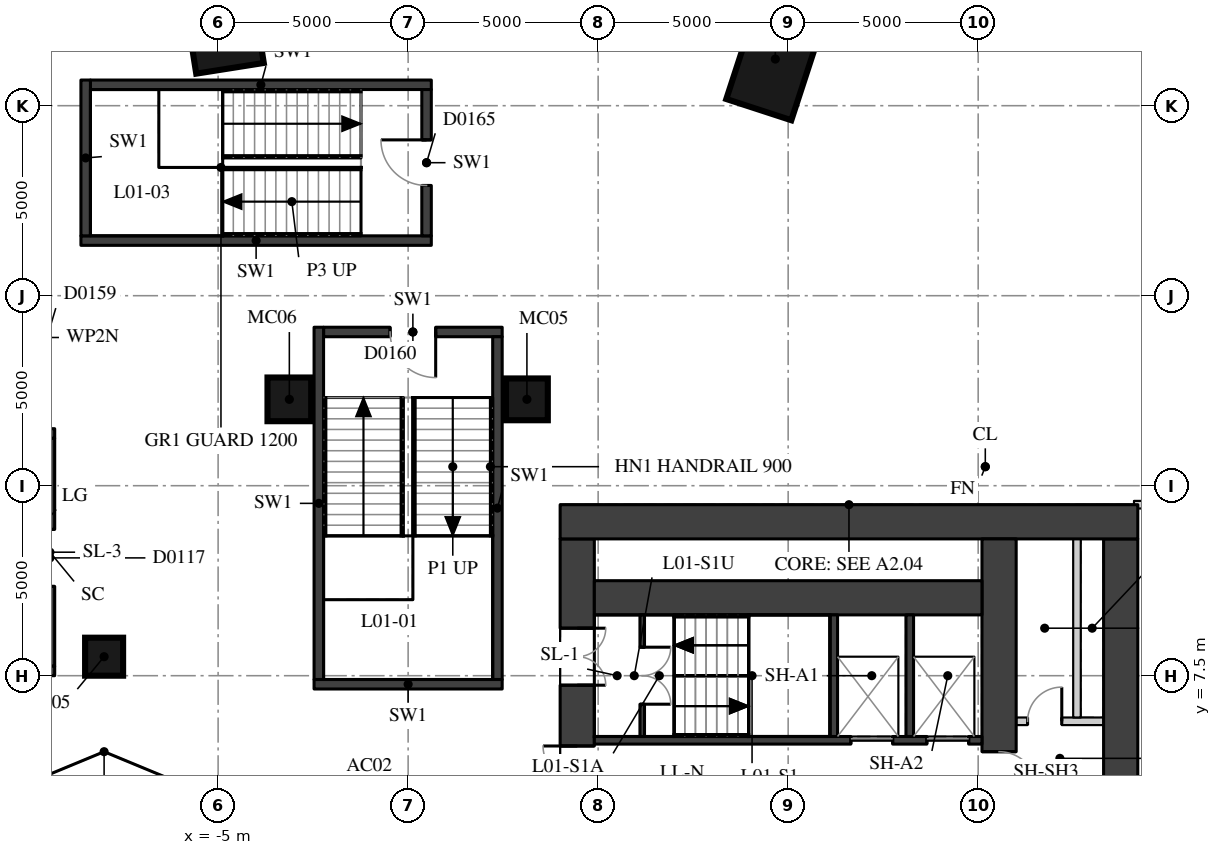
"""IFC4 building model, lengths in metres.
Left out: names, types, materials, properties, quantities, classifications, styles, units other than length and angle.
Written with IfcOpenShell. Run it as: python <this file> out.ifc"""

import sys

from ifc_helpers import new_model, si_unit, direction, frame, frame_2d, origin, origin_2d, place, context, subcontext, project, spatial, rectangle, extrude, element, fill, save


model = new_model("IFC4")
c1 = context("Model", 3, precision=1e-05, world=origin(), true_north=direction((0.0, 1.0)))
c2 = subcontext(c1, "Body", "Model", "MODEL_VIEW")
j1 = project(units=[si_unit("LENGTHUNIT", "METRE"), si_unit("PLANEANGLEUNIT", "RADIAN")], contexts=[c1])
p1 = place(None, origin())
s1 = spatial("IfcSite", under=j1, at=p1, CompositionType="ELEMENT")
p2 = place(p1, origin())
s2 = spatial("IfcBuilding", under=s1, at=p2, CompositionType="ELEMENT")
p3 = place(p2, frame((0.0, 0.0, 7.5)))
s3 = spatial("IfcBuildingStorey", under=s2, at=p3, CompositionType="ELEMENT", Elevation=7.5)
for number, where, z_axis, x_axis in (
    (1, (9.662, 23.727, 0.0), (0.0, 0.0, 1.0), (0.31, 0.951, 0.0)),
    (2, (-4.906, 24.866, 0.0), (0.0, 0.0, 1.0), (-0.156, 0.988, 0.0)),
):
    element("IfcColumn", number, at=place(p3, frame(where, z_axis=z_axis, x_axis=x_axis)), inside=s3, PredefinedType="COLUMN", context=c2, shape_type="SweptSolid", body=[
        extrude(rectangle(XDim=2.8, YDim=1.8, at=origin_2d()), origin(), (0.0, 0.0, 1.0), 5.0),
    ])
p4 = place(p3, frame((-8.0, 8.0, 0.0), z_axis=(0.0, 0.0, 1.0), x_axis=(1.0, 0.0, 0.0)))
e3 = element("IfcColumn", 3, at=p4, inside=s3, PredefinedType="COLUMN", context=c2, shape_type="SweptSolid", body=[
    extrude(rectangle(XDim=1.0, YDim=1.0, at=origin_2d()), origin(), (0.0, 0.0, 1.0), 5.0),
])
p5 = place(p3, frame((3.126, 14.772, 0.0), z_axis=(0.0, 0.0, 1.0), x_axis=(1.0, 0.0, 0.0)))
e4 = element("IfcColumn", 4, at=p5, inside=s3, PredefinedType="COLUMN", context=c2, shape_type="SweptSolid", body=[
    extrude(rectangle(XDim=1.1, YDim=1.1, at=origin_2d()), origin(), (0.0, 0.0, 1.0), 5.0),
])
p6 = place(p3, frame((-3.126, 14.772, 0.0), z_axis=(0.0, 0.0, 1.0), x_axis=(1.0, 0.0, 0.0)))
e5 = element("IfcColumn", 5, at=p6, inside=s3, PredefinedType="COLUMN", context=c2, shape_type="SweptSolid", body=[
    extrude(rectangle(XDim=1.15, YDim=1.15, at=origin_2d()), origin(), (0.0, 0.0, 1.0), 5.0),
])
p7 = place(p3, frame((4.45, -11.1, 0.0), z_axis=(0.0, 0.0, 1.0), x_axis=(0.0, 1.0, 0.0)))
e6 = element("IfcWall", 6, at=p7, inside=s3, PredefinedType="SHEAR", context=c2, shape_type="SweptSolid", body=[
    extrude(rectangle(XDim=22.2, YDim=0.9, at=frame_2d((11.1, 0.0))), origin(), (0.0, 0.0, 1.0), 4.59),
])
p8 = place(p7, frame((2.35, 0.0, 0.0)))
e7 = element("IfcOpeningElement", 7, at=p8, cuts=e6, PredefinedType="OPENING", context=c2, shape_type="SweptSolid", body=[
    extrude(rectangle(XDim=1.5, YDim=2.1, at=frame_2d((0.75, 1.05))), frame((0.0, 0.46, 0.0), z_axis=(0.0, -1.0, 0.0), x_axis=(1.0, 0.0, 0.0)), (0.0, 0.0, 1.0), 0.92),
])
p9 = place(p7, frame((5.45, 0.0, 0.0)))
e8 = element("IfcOpeningElement", 8, at=p9, cuts=e6, PredefinedType="OPENING", context=c2, shape_type="SweptSolid", body=[
    extrude(rectangle(XDim=1.8, YDim=2.1, at=frame_2d((0.9, 1.05))), frame((0.0, 0.46, 0.0), z_axis=(0.0, -1.0, 0.0), x_axis=(1.0, 0.0, 0.0)), (0.0, 0.0, 1.0), 0.92),
])
p10 = place(p7, frame((7.95, 0.0, 0.0)))
e9 = element("IfcOpeningElement", 9, at=p10, cuts=e6, PredefinedType="OPENING", context=c2, shape_type="SweptSolid", body=[
    extrude(rectangle(XDim=1.1, YDim=2.1, at=frame_2d((0.55, 1.05))), frame((0.0, 0.46, 0.0), z_axis=(0.0, -1.0, 0.0), x_axis=(1.0, 0.0, 0.0)), (0.0, 0.0, 1.0), 0.92),
])
p11 = place(p7, frame((10.6, 0.0, 0.0)))
e10 = element("IfcOpeningElement", 10, at=p11, cuts=e6, PredefinedType="OPENING", context=c2, shape_type="SweptSolid", body=[
    extrude(rectangle(XDim=1.0, YDim=2.1, at=frame_2d((0.5, 1.05))), frame((0.0, 0.46, 0.0), z_axis=(0.0, -1.0, 0.0), x_axis=(1.0, 0.0, 0.0)), (0.0, 0.0, 1.0), 0.92),
])
p12 = place(p7, frame((13.15, 0.0, 0.0)))
e11 = element("IfcOpeningElement", 11, at=p12, cuts=e6, PredefinedType="OPENING", context=c2, shape_type="SweptSolid", body=[
    extrude(rectangle(XDim=1.1, YDim=2.1, at=frame_2d((0.55, 1.05))), frame((0.0, 0.46, 0.0), z_axis=(0.0, -1.0, 0.0), x_axis=(1.0, 0.0, 0.0)), (0.0, 0.0, 1.0), 0.92),
])
p13 = place(p7, frame((14.95, 0.0, 0.0)))
e12 = element("IfcOpeningElement", 12, at=p13, cuts=e6, PredefinedType="OPENING", context=c2, shape_type="SweptSolid", body=[
    extrude(rectangle(XDim=1.8, YDim=2.1, at=frame_2d((0.9, 1.05))), frame((0.0, 0.46, 0.0), z_axis=(0.0, -1.0, 0.0), x_axis=(1.0, 0.0, 0.0)), (0.0, 0.0, 1.0), 0.92),
])
p14 = place(p7, frame((18.35, 0.0, 0.0)))
e13 = element("IfcOpeningElement", 13, at=p14, cuts=e6, PredefinedType="OPENING", context=c2, shape_type="SweptSolid", body=[
    extrude(rectangle(XDim=1.5, YDim=2.1, at=frame_2d((0.75, 1.05))), frame((0.0, 0.46, 0.0), z_axis=(0.0, -1.0, 0.0), x_axis=(1.0, 0.0, 0.0)), (0.0, 0.0, 1.0), 0.92),
])
p15 = place(p3, frame((18.75, -11.1, 0.0), z_axis=(0.0, 0.0, 1.0), x_axis=(0.0, 1.0, 0.0)))
e14 = element("IfcWall", 14, at=p15, inside=s3, PredefinedType="SHEAR", context=c2, shape_type="SweptSolid", body=[
    extrude(rectangle(XDim=22.2, YDim=0.9, at=frame_2d((11.1, 0.0))), origin(), (0.0, 0.0, 1.0), 4.59),
])
p16 = place(p3, frame((4.0, 11.55, 0.0), z_axis=(0.0, 0.0, 1.0), x_axis=(1.0, 0.0, 0.0)))
e15 = element("IfcWall", 15, at=p16, inside=s3, PredefinedType="SHEAR", context=c2, shape_type="SweptSolid", body=[
    extrude(rectangle(XDim=15.2, YDim=0.9, at=frame_2d((7.6, 0.0))), origin(), (0.0, 0.0, 1.0), 4.59),
])
p17 = place(p3, frame((15.55, -11.1, 0.0), z_axis=(0.0, 0.0, 1.0), x_axis=(0.0, 1.0, 0.0)))
e16 = element("IfcWall", 16, at=p17, inside=s3, PredefinedType="SHEAR", context=c2, shape_type="SweptSolid", body=[
    extrude(rectangle(XDim=22.2, YDim=0.9, at=frame_2d((11.1, 0.0))), origin(), (0.0, 0.0, 1.0), 4.59),
])
p18 = place(p17, frame((15.6, 0.0, 0.0)))
e17 = element("IfcOpeningElement", 17, at=p18, cuts=e16, PredefinedType="OPENING", context=c2, shape_type="SweptSolid", body=[
    extrude(rectangle(XDim=1.0, YDim=2.1, at=frame_2d((0.5, 1.05))), frame((0.0, 0.46, 0.0), z_axis=(0.0, -1.0, 0.0), x_axis=(1.0, 0.0, 0.0)), (0.0, 0.0, 1.0), 0.92),
])
p19 = place(p17, frame((5.6, 0.0, 0.0)))
e18 = element("IfcOpeningElement", 18, at=p19, cuts=e16, PredefinedType="OPENING", context=c2, shape_type="SweptSolid", body=[
    extrude(rectangle(XDim=1.0, YDim=2.1, at=frame_2d((0.5, 1.05))), frame((0.0, 0.46, 0.0), z_axis=(0.0, -1.0, 0.0), x_axis=(1.0, 0.0, 0.0)), (0.0, 0.0, 1.0), 0.92),
])
p20 = place(p3, frame((4.9, 9.55, 0.0), z_axis=(0.0, 0.0, 1.0), x_axis=(1.0, 0.0, 0.0)))
e19 = element("IfcWall", 19, at=p20, inside=s3, PredefinedType="SHEAR", context=c2, shape_type="SweptSolid", body=[
    extrude(rectangle(XDim=10.2, YDim=0.9, at=frame_2d((5.1, 0.0))), origin(), (0.0, 0.0, 1.0), 4.59),
])
p21 = place(p3, frame((4.9, 5.8, 0.0), z_axis=(0.0, 0.0, 1.0), x_axis=(1.0, 0.0, 0.0)))
e20 = element("IfcWall", 20, at=p21, inside=s3, PredefinedType="SHEAR", context=c2, shape_type="SweptSolid", body=[
    extrude(rectangle(XDim=10.2, YDim=0.2, at=frame_2d((5.1, 0.0))), origin(), (0.0, 0.0, 1.0), 4.59),
])
p22 = place(p21, frame((6.75, 0.0, 0.0)))
e21 = element("IfcOpeningElement", 21, at=p22, cuts=e20, PredefinedType="OPENING", context=c2, shape_type="SweptSolid", body=[
    extrude(rectangle(XDim=1.1, YDim=2.1, at=frame_2d((0.55, 1.05))), frame((0.0, 0.11, 0.0), z_axis=(0.0, -1.0, 0.0), x_axis=(1.0, 0.0, 0.0)), (0.0, 0.0, 1.0), 0.22),
])
p23 = place(p21, frame((8.75, 0.0, 0.0)))
e22 = element("IfcOpeningElement", 22, at=p23, cuts=e20, PredefinedType="OPENING", context=c2, shape_type="SweptSolid", body=[
    extrude(rectangle(XDim=1.1, YDim=2.1, at=frame_2d((0.55, 1.05))), frame((0.0, 0.11, 0.0), z_axis=(0.0, -1.0, 0.0), x_axis=(1.0, 0.0, 0.0)), (0.0, 0.0, 1.0), 0.22),
])
for number, where, z_axis, x_axis in (
    (23, (11.2, 5.9, 0.0), (0.0, 0.0, 1.0), (0.0, 1.0, 0.0)),
    (24, (13.2, 5.9, 0.0), (0.0, 0.0, 1.0), (0.0, 1.0, 0.0)),
):
    element("IfcWall", number, at=place(p3, frame(where, z_axis=z_axis, x_axis=x_axis)), inside=s3, PredefinedType="SHEAR", context=c2, shape_type="SweptSolid", body=[
        extrude(rectangle(XDim=3.2, YDim=0.2, at=frame_2d((1.6, 0.0))), origin(), (0.0, 0.0, 1.0), 4.59),
    ])
p24 = place(p3, frame((6.16, 5.9, 0.0), z_axis=(0.0, 0.0, 1.0), x_axis=(0.0, 1.0, 0.0)))
e25 = element("IfcWall", 25, at=p24, inside=s3, PredefinedType="SHEAR", context=c2, shape_type="SweptSolid", body=[
    extrude(rectangle(XDim=3.2, YDim=0.12, at=frame_2d((1.6, 0.0))), origin(), (0.0, 0.0, 1.0), 2.29),
])
p25 = place(p24, frame((0.85, 0.0, 0.0)))
e26 = element("IfcOpeningElement", 26, at=p25, cuts=e25, PredefinedType="OPENING", context=c2, shape_type="SweptSolid", body=[
    extrude(rectangle(XDim=1.5, YDim=2.1, at=frame_2d((0.75, 1.05))), frame((0.0, 0.07, 0.0), z_axis=(0.0, -1.0, 0.0), x_axis=(1.0, 0.0, 0.0)), (0.0, 0.0, 1.0), 0.14),
])
p26 = place(p3, frame((16.0, 6.3, 0.0), z_axis=(0.0, 0.0, 1.0), x_axis=(1.0, 0.0, 0.0)))
e27 = element("IfcWall", 27, at=p26, inside=s3, PredefinedType="PARTITIONING", context=c2, shape_type="SweptSolid", body=[
    extrude(rectangle(XDim=2.3, YDim=0.2, at=frame_2d((1.15, 0.0))), origin(), (0.0, 0.0, 1.0), 4.59),
])
p27 = place(p26, frame((0.3, 0.0, 0.0)))
e28 = element("IfcOpeningElement", 28, at=p27, cuts=e27, PredefinedType="OPENING", context=c2, shape_type="SweptSolid", body=[
    extrude(rectangle(XDim=0.9, YDim=2.1, at=frame_2d((0.45, 1.05))), frame((0.0, 0.11, 0.0), z_axis=(0.0, -1.0, 0.0), x_axis=(1.0, 0.0, 0.0)), (0.0, 0.0, 1.0), 0.22),
])
p28 = place(p3, frame((17.6, 6.4, 0.0), z_axis=(0.0, 0.0, 1.0), x_axis=(0.0, 1.0, 0.0)))
e29 = element("IfcWall", 29, at=p28, inside=s3, PredefinedType="PARTITIONING", context=c2, shape_type="SweptSolid", body=[
    extrude(rectangle(XDim=4.7, YDim=0.2, at=frame_2d((2.35, 0.0))), origin(), (0.0, 0.0, 1.0), 4.59),
])
p29 = place(p3, frame((-9.425, 7.75, -0.41), z_axis=(0.0, 0.0, 1.0), x_axis=(0.0, 1.0, 0.0)))
e30 = element("IfcWall", 30, at=p29, inside=s3, PredefinedType="SHEAR", context=c2, shape_type="SweptSolid", body=[
    extrude(rectangle(XDim=6.0, YDim=0.25, at=frame_2d((3.0, 0.0))), origin(), (0.0, 0.0, 1.0), 5.0),
])
p30 = place(p29, frame((2.1, 0.0, 0.41)))
e31 = element("IfcOpeningElement", 31, at=p30, cuts=e30, PredefinedType="OPENING", context=c2, shape_type="SweptSolid", body=[
    extrude(rectangle(XDim=1.5, YDim=2.1, at=frame_2d((0.75, 1.05))), frame((0.0, 0.135, 0.0), z_axis=(0.0, -1.0, 0.0), x_axis=(1.0, 0.0, 0.0)), (0.0, 0.0, 1.0), 0.27),
])
for number, where, z_axis, x_axis in (
    (32, (-14.5, 13.875, -0.41), (0.0, 0.0, 1.0), (1.0, 0.0, 0.0)),
    (33, (-14.5, 7.625, -0.41), (0.0, 0.0, 1.0), (1.0, 0.0, 0.0)),
):
    element("IfcWall", number, at=place(p3, frame(where, z_axis=z_axis, x_axis=x_axis)), inside=s3, PredefinedType="SHEAR", context=c2, shape_type="SweptSolid", body=[
        extrude(rectangle(XDim=5.2, YDim=0.25, at=frame_2d((2.6, 0.0))), origin(), (0.0, 0.0, 1.0), 5.0),
    ])
p31 = place(p3, frame((-2.475, 7.275, 0.0), z_axis=(0.0, 0.0, 1.0), x_axis=(1.0, 0.0, 0.0)))
e34 = element("IfcWall", 34, at=p31, inside=s3, PredefinedType="SOLIDWALL", context=c2, shape_type="SweptSolid", body=[
    extrude(rectangle(XDim=4.95, YDim=0.25, at=frame_2d((2.475, 0.0))), origin(), (0.0, 0.0, 1.0), 4.59),
])
p32 = place(p3, frame((19.1, 12.0, 0.0), z_axis=(0.0, 0.0, 1.0), x_axis=(1.0, 0.0, 0.0)))
e35 = element("IfcWall", 35, at=p32, inside=s3, PredefinedType="PARTITIONING", context=c2, shape_type="SweptSolid", body=[
    extrude(rectangle(XDim=21.767, YDim=0.2, at=frame_2d((10.883, 0.0))), origin(), (0.0, 0.0, 1.0), 3.59),
])
p33 = place(p32, frame((4.4, 0.0, 0.0)))
e36 = element("IfcOpeningElement", 36, at=p33, cuts=e35, PredefinedType="OPENING", context=c2, shape_type="SweptSolid", body=[
    extrude(rectangle(XDim=1.0, YDim=2.1, at=frame_2d((0.5, 1.05))), frame((0.0, 0.11, 0.0), z_axis=(0.0, -1.0, 0.0), x_axis=(1.0, 0.0, 0.0)), (0.0, 0.0, 1.0), 0.22),
])
p34 = place(p3, frame((-2.225, 16.545, 0.0), z_axis=(0.0, 0.0, 1.0), x_axis=(1.0, 0.0, 0.0)))
e37 = element("IfcWall", 37, at=p34, inside=s3, PredefinedType="SOLIDWALL", context=c2, shape_type="SweptSolid", body=[
    extrude(rectangle(XDim=4.7, YDim=0.25, at=frame_2d((2.35, 0.0))), origin(), (0.0, 0.0, 1.0), 4.59),
])
p35 = place(p34, frame((1.75, 0.0, 0.0)))
e38 = element("IfcOpeningElement", 38, at=p35, cuts=e37, PredefinedType="OPENING", context=c2, shape_type="SweptSolid", body=[
    extrude(rectangle(XDim=1.2, YDim=2.1, at=frame_2d((0.6, 1.05))), frame((0.0, 0.135, 0.0), z_axis=(0.0, -1.0, 0.0), x_axis=(1.0, 0.0, 0.0)), (0.0, 0.0, 1.0), 0.27),
])
p36 = place(p3, frame((-8.61, 18.95, 0.0), z_axis=(0.0, 0.0, 1.0), x_axis=(1.0, 0.0, 0.0)))
e39 = element("IfcWall", 39, at=p36, inside=s3, PredefinedType="SOLIDWALL", context=c2, shape_type="SweptSolid", body=[
    extrude(rectangle(XDim=9.22, YDim=0.25, at=frame_2d((4.61, 0.0))), origin(), (0.0, 0.0, 1.0), 4.59),
])
p37 = place(p3, frame((-8.36, 23.05, 0.0), z_axis=(0.0, 0.0, 1.0), x_axis=(1.0, 0.0, 0.0)))
e40 = element("IfcWall", 40, at=p37, inside=s3, PredefinedType="SOLIDWALL", context=c2, shape_type="SweptSolid", body=[
    extrude(rectangle(XDim=8.97, YDim=0.25, at=frame_2d((4.485, 0.0))), origin(), (0.0, 0.0, 1.0), 4.59),
])
p38 = place(p3, frame((-8.485, 19.075, 0.0), z_axis=(0.0, 0.0, 1.0), x_axis=(0.0, 1.0, 0.0)))
e41 = element("IfcWall", 41, at=p38, inside=s3, PredefinedType="SOLIDWALL", context=c2, shape_type="SweptSolid", body=[
    extrude(rectangle(XDim=4.1, YDim=0.25, at=frame_2d((2.05, 0.0))), origin(), (0.0, 0.0, 1.0), 4.59),
])
p39 = place(p3, frame((-2.35, 7.4, 0.0), z_axis=(0.0, 0.0, 1.0), x_axis=(0.0, 1.0, 0.0)))
e42 = element("IfcWall", 42, at=p39, inside=s3, PredefinedType="SOLIDWALL", context=c2, shape_type="SweptSolid", body=[
    extrude(rectangle(XDim=9.27, YDim=0.25, at=frame_2d((4.635, 0.0))), origin(), (0.0, 0.0, 1.0), 4.59),
])
p40 = place(p3, frame((0.485, 19.075, 0.0), z_axis=(0.0, 0.0, 1.0), x_axis=(0.0, 1.0, 0.0)))
e43 = element("IfcWall", 43, at=p40, inside=s3, PredefinedType="SOLIDWALL", context=c2, shape_type="SweptSolid", body=[
    extrude(rectangle(XDim=3.85, YDim=0.25, at=frame_2d((1.925, 0.0))), origin(), (0.0, 0.0, 1.0), 4.59),
])
p41 = place(p40, frame((1.325, 0.0, 0.0)))
e44 = element("IfcOpeningElement", 44, at=p41, cuts=e43, PredefinedType="OPENING", context=c2, shape_type="SweptSolid", body=[
    extrude(rectangle(XDim=1.2, YDim=2.1, at=frame_2d((0.6, 1.05))), frame((0.0, 0.135, 0.0), z_axis=(0.0, -1.0, 0.0), x_axis=(1.0, 0.0, 0.0)), (0.0, 0.0, 1.0), 0.27),
])
p42 = place(p3, frame((2.35, 7.4, 0.0), z_axis=(0.0, 0.0, 1.0), x_axis=(0.0, 1.0, 0.0)))
e45 = element("IfcWall", 45, at=p42, inside=s3, PredefinedType="SOLIDWALL", context=c2, shape_type="SweptSolid", body=[
    extrude(rectangle(XDim=9.02, YDim=0.25, at=frame_2d((4.51, 0.0))), origin(), (0.0, 0.0, 1.0), 4.59),
])
p43 = place(p13, origin())
e46 = element("IfcDoor", 46, at=p43, inside=s3, OperationType="DOUBLE_DOOR_SINGLE_SWING", PredefinedType="DOOR", context=c2, shape_type="SweptSolid", body=[
    extrude(rectangle(XDim=1.8, YDim=2.1, at=frame_2d((0.9, 1.05))), frame((0.0, 0.025, 0.0), z_axis=(0.0, -1.0, 0.0), x_axis=(1.0, 0.0, 0.0)), (0.0, 0.0, 1.0), 0.05),
])
fill(e12, e46)
p44 = place(p14, origin())
e47 = element("IfcDoor", 47, at=p44, inside=s3, OperationType="DOUBLE_DOOR_SINGLE_SWING", PredefinedType="DOOR", context=c2, shape_type="SweptSolid", body=[
    extrude(rectangle(XDim=1.5, YDim=2.1, at=frame_2d((0.75, 1.05))), frame((0.0, 0.025, 0.0), z_axis=(0.0, -1.0, 0.0), x_axis=(1.0, 0.0, 0.0)), (0.0, 0.0, 1.0), 0.05),
])
fill(e13, e47)
p45 = place(p25, origin())
e48 = element("IfcDoor", 48, at=p45, inside=s3, OperationType="DOUBLE_DOOR_SINGLE_SWING", PredefinedType="DOOR", context=c2, shape_type="SweptSolid", body=[
    extrude(rectangle(XDim=1.5, YDim=2.1, at=frame_2d((0.75, 1.05))), frame((0.0, 0.025, 0.0), z_axis=(0.0, -1.0, 0.0), x_axis=(1.0, 0.0, 0.0)), (0.0, 0.0, 1.0), 0.05),
])
fill(e26, e48)
p46 = place(p22, origin())
e49 = element("IfcDoor", 49, at=p46, inside=s3, OperationType="DOUBLE_DOOR_SLIDING", PredefinedType="DOOR", context=c2, shape_type="SweptSolid", body=[
    extrude(rectangle(XDim=1.1, YDim=2.1, at=frame_2d((0.55, 1.05))), frame((0.0, 0.025, 0.0), z_axis=(0.0, -1.0, 0.0), x_axis=(1.0, 0.0, 0.0)), (0.0, 0.0, 1.0), 0.05),
])
fill(e21, e49)
p47 = place(p23, origin())
e50 = element("IfcDoor", 50, at=p47, inside=s3, OperationType="DOUBLE_DOOR_SLIDING", PredefinedType="DOOR", context=c2, shape_type="SweptSolid", body=[
    extrude(rectangle(XDim=1.1, YDim=2.1, at=frame_2d((0.55, 1.05))), frame((0.0, 0.025, 0.0), z_axis=(0.0, -1.0, 0.0), x_axis=(1.0, 0.0, 0.0)), (0.0, 0.0, 1.0), 0.05),
])
fill(e22, e50)
p48 = place(p18, origin())
e51 = element("IfcDoor", 51, at=p48, inside=s3, OperationType="SINGLE_SWING_RIGHT", PredefinedType="DOOR", context=c2, shape_type="SweptSolid", body=[
    extrude(rectangle(XDim=1.0, YDim=2.1, at=frame_2d((0.5, 1.05))), frame((0.0, 0.025, 0.0), z_axis=(0.0, -1.0, 0.0), x_axis=(1.0, 0.0, 0.0)), (0.0, 0.0, 1.0), 0.05),
])
fill(e17, e51)
p49 = place(p27, origin())
e52 = element("IfcDoor", 52, at=p49, inside=s3, OperationType="SINGLE_SWING_RIGHT", PredefinedType="DOOR", context=c2, shape_type="SweptSolid", body=[
    extrude(rectangle(XDim=0.9, YDim=2.1, at=frame_2d((0.45, 1.05))), frame((0.0, 0.025, 0.0), z_axis=(0.0, -1.0, 0.0), x_axis=(1.0, 0.0, 0.0)), (0.0, 0.0, 1.0), 0.05),
])
fill(e28, e52)
p50 = place(p35, origin())
e53 = element("IfcDoor", 53, at=p50, inside=s3, OperationType="SINGLE_SWING_LEFT", PredefinedType="DOOR", context=c2, shape_type="SweptSolid", body=[
    extrude(rectangle(XDim=1.2, YDim=2.1, at=frame_2d((0.6, 1.05))), frame((0.0, 0.025, 0.0), z_axis=(0.0, -1.0, 0.0), x_axis=(1.0, 0.0, 0.0)), (0.0, 0.0, 1.0), 0.05),
])
fill(e38, e53)
p51 = place(p41, origin())
e54 = element("IfcDoor", 54, at=p51, inside=s3, OperationType="SINGLE_SWING_RIGHT", PredefinedType="DOOR", context=c2, shape_type="SweptSolid", body=[
    extrude(rectangle(XDim=1.2, YDim=2.1, at=frame_2d((0.6, 1.05))), frame((0.0, 0.025, 0.0), z_axis=(0.0, -1.0, 0.0), x_axis=(1.0, 0.0, 0.0)), (0.0, 0.0, 1.0), 0.05),
])
fill(e44, e54)
save(model, sys.argv[1])
